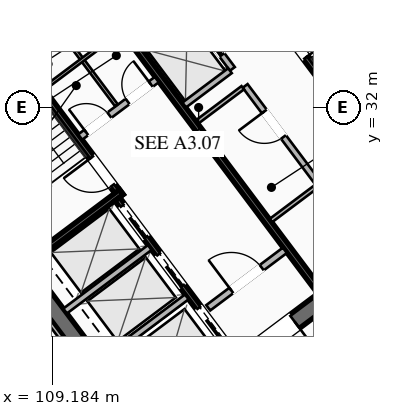
"""IFC4 building model, lengths in metres.
Left out: names, types, materials, properties, quantities, classifications, styles, units other than length and angle.
Written with IfcOpenShell. Run it as: python <this file> out.ifc"""

import sys

from ifc_helpers import new_model, si_unit, direction, frame, frame_2d, origin, place, context, subcontext, project, spatial, rectangle, extrude, element, fill, save


model = new_model("IFC4")
c1 = context("Model", 3, precision=1e-05, world=origin(), true_north=direction((0.0, 1.0)))
c2 = subcontext(c1, "Body", "Model", "MODEL_VIEW")
j1 = project(units=[si_unit("LENGTHUNIT", "METRE"), si_unit("PLANEANGLEUNIT", "RADIAN")], contexts=[c1])
p1 = place(None, origin())
s1 = spatial("IfcSite", under=j1, at=p1, CompositionType="ELEMENT")
p2 = place(p1, origin())
s2 = spatial("IfcBuilding", under=s1, at=p2, CompositionType="ELEMENT")
p3 = place(p2, frame((0.0, 0.0, 132.15)))
s3 = spatial("IfcBuildingStorey", under=s2, at=p3, CompositionType="ELEMENT", Elevation=132.15)
for number, where, z_axis, x_axis in (
    (1, (112.436, 21.077, 0.0), (0.0, 0.0, 1.0), (-0.6, 0.8, 0.0)),
    (2, (115.564, 42.923, 0.0), (0.0, 0.0, 1.0), (0.6, -0.8, 0.0)),
):
    element("IfcWall", number, at=place(p3, frame(where, z_axis=z_axis, x_axis=x_axis)), inside=s3, PredefinedType="SHEAR", context=c2, shape_type="SweptSolid", body=[
        extrude(rectangle(XDim=15.6, YDim=0.55, at=frame_2d((7.8, 0.0))), origin(), (0.0, 0.0, 1.0), 3.55),
    ])
p4 = place(p3, frame((124.539, 30.498, 0.0), z_axis=(0.0, 0.0, 1.0), x_axis=(-0.799998054672, -0.600002593761, 0.0)))
e3 = element("IfcWall", 3, at=p4, inside=s3, PredefinedType="SHEAR", context=c2, shape_type="SweptSolid", body=[
    extrude(rectangle(XDim=15.06, YDim=0.55, at=frame_2d((7.53, 0.0))), origin(), (0.0, 0.0, 1.0), 3.55),
])
p5 = place(p4, frame((9.23, 0.0, 0.0)))
e4 = element("IfcOpeningElement", 4, at=p5, cuts=e3, PredefinedType="OPENING", context=c2, shape_type="SweptSolid", body=[
    extrude(rectangle(XDim=1.25, YDim=2.25, at=frame_2d((0.625, 1.125))), frame((0.0, 0.285, 0.0), z_axis=(0.0, -1.0, 0.0), x_axis=(1.0, 0.0, 0.0)), (0.0, 0.0, 1.0), 0.57),
])
p6 = place(p4, frame((4.18, 0.0, 0.0)))
e5 = element("IfcOpeningElement", 5, at=p6, cuts=e3, PredefinedType="OPENING", context=c2, shape_type="SweptSolid", body=[
    extrude(rectangle(XDim=1.25, YDim=2.25, at=frame_2d((0.625, 1.125))), frame((0.0, 0.285, 0.0), z_axis=(0.0, -1.0, 0.0), x_axis=(1.0, 0.0, 0.0)), (0.0, 0.0, 1.0), 0.57),
])
p7 = place(p3, frame((103.461, 33.502, 0.0), z_axis=(0.0, 0.0, 1.0), x_axis=(0.799998054672, 0.600002593761, 0.0)))
e6 = element("IfcWall", 6, at=p7, inside=s3, PredefinedType="SHEAR", context=c2, shape_type="SweptSolid", body=[
    extrude(rectangle(XDim=15.06, YDim=0.55, at=frame_2d((7.53, 0.0))), origin(), (0.0, 0.0, 1.0), 3.55),
])
p8 = place(p7, frame((4.58, 0.0, 0.0)))
e7 = element("IfcOpeningElement", 7, at=p8, cuts=e6, PredefinedType="OPENING", context=c2, shape_type="SweptSolid", body=[
    extrude(rectangle(XDim=1.25, YDim=2.25, at=frame_2d((0.625, 1.125))), frame((0.0, 0.285, 0.0), z_axis=(0.0, -1.0, 0.0), x_axis=(1.0, 0.0, 0.0)), (0.0, 0.0, 1.0), 0.57),
])
p9 = place(p7, frame((9.63, 0.0, 0.0)))
e8 = element("IfcOpeningElement", 8, at=p9, cuts=e6, PredefinedType="OPENING", context=c2, shape_type="SweptSolid", body=[
    extrude(rectangle(XDim=1.25, YDim=2.25, at=frame_2d((0.625, 1.125))), frame((0.0, 0.285, 0.0), z_axis=(0.0, -1.0, 0.0), x_axis=(1.0, 0.0, 0.0)), (0.0, 0.0, 1.0), 0.57),
])
p10 = place(p3, frame((111.44, 29.08, 0.0), z_axis=(0.0, 0.0, 1.0), x_axis=(-0.59999029481, 0.8000072788, 0.0)))
e9 = element("IfcWall", 9, at=p10, inside=s3, PredefinedType="SHEAR", context=c2, shape_type="SweptSolid", body=[
    extrude(rectangle(XDim=8.05, YDim=0.2, at=frame_2d((4.025, 0.0))), origin(), (0.0, 0.0, 1.0), 3.37),
])
p11 = place(p10, frame((0.45, 0.0, 0.0)))
e10 = element("IfcOpeningElement", 10, at=p11, cuts=e9, PredefinedType="OPENING", context=c2, shape_type="SweptSolid", body=[
    extrude(rectangle(XDim=1.15, YDim=2.2, at=frame_2d((0.575, 1.1))), frame((0.0, 0.11, 0.0), z_axis=(0.0, -1.0, 0.0), x_axis=(1.0, 0.0, 0.0)), (0.0, 0.0, 1.0), 0.22),
])
p12 = place(p3, frame((108.396, 26.922, 0.0), z_axis=(0.0, 0.0, 1.0), x_axis=(0.800015298837, 0.599979601008, 0.0)))
e11 = element("IfcWall", 11, at=p12, inside=s3, PredefinedType="SHEAR", context=c2, shape_type="SweptSolid", body=[
    extrude(rectangle(XDim=3.83, YDim=0.2, at=frame_2d((1.915, 0.0))), origin(), (0.0, 0.0, 1.0), 3.37),
])
p13 = place(p3, frame((116.56, 34.92, 0.0), z_axis=(0.0, 0.0, 1.0), x_axis=(0.59999029481, -0.8000072788, 0.0)))
e12 = element("IfcWall", 12, at=p13, inside=s3, PredefinedType="SHEAR", context=c2, shape_type="SweptSolid", body=[
    extrude(rectangle(XDim=8.05, YDim=0.2, at=frame_2d((4.025, 0.0))), origin(), (0.0, 0.0, 1.0), 3.37),
])
p14 = place(p13, frame((0.45, 0.0, 0.0)))
e13 = element("IfcOpeningElement", 13, at=p14, cuts=e12, PredefinedType="OPENING", context=c2, shape_type="SweptSolid", body=[
    extrude(rectangle(XDim=1.15, YDim=2.2, at=frame_2d((0.575, 1.1))), frame((0.0, 0.11, 0.0), z_axis=(0.0, -1.0, 0.0), x_axis=(1.0, 0.0, 0.0)), (0.0, 0.0, 1.0), 0.22),
])
p15 = place(p3, frame((117.998, 25.936, 0.0), z_axis=(0.0, 0.0, 1.0), x_axis=(-0.600002693989, 0.799997979501, 0.0)))
e14 = element("IfcWall", 14, at=p15, inside=s3, PredefinedType="SHEAR", context=c2, shape_type="SweptSolid", body=[
    extrude(rectangle(XDim=14.5, YDim=0.2, at=frame_2d((7.25, 0.0))), origin(), (0.0, 0.0, 1.0), 3.37),
])
p16 = place(p3, frame((110.104, 31.028, 0.0), z_axis=(0.0, 0.0, 1.0), x_axis=(0.800018601094, 0.59997519774, 0.0)))
e15 = element("IfcWall", 15, at=p16, inside=s3, PredefinedType="SOLIDWALL", context=c2, shape_type="SweptSolid", body=[
    extrude(rectangle(XDim=3.15, YDim=0.22, at=frame_2d((1.575, 0.0))), origin(), (0.0, 0.0, 1.0), 2.723),
])
p17 = place(p16, frame((0.25, 0.0, 0.0)))
e16 = element("IfcOpeningElement", 16, at=p17, cuts=e15, PredefinedType="OPENING", context=c2, shape_type="SweptSolid", body=[
    extrude(rectangle(XDim=0.95, YDim=2.05, at=frame_2d((0.475, 1.025))), frame((0.0, 0.12, 0.0), z_axis=(0.0, -1.0, 0.0), x_axis=(1.0, 0.0, 0.0)), (0.0, 0.0, 1.0), 0.24),
])
p18 = place(p16, frame((1.95, 0.0, 0.0)))
e17 = element("IfcOpeningElement", 17, at=p18, cuts=e15, PredefinedType="OPENING", context=c2, shape_type="SweptSolid", body=[
    extrude(rectangle(XDim=0.95, YDim=2.05, at=frame_2d((0.475, 1.025))), frame((0.0, 0.12, 0.0), z_axis=(0.0, -1.0, 0.0), x_axis=(1.0, 0.0, 0.0)), (0.0, 0.0, 1.0), 0.24),
])
p19 = place(p3, frame((114.316, 25.412, 0.0), z_axis=(0.0, 0.0, 1.0), x_axis=(0.800018601094, 0.59997519774, 0.0)))
e18 = element("IfcWall", 18, at=p19, inside=s3, PredefinedType="SOLIDWALL", context=c2, shape_type="SweptSolid", body=[
    extrude(rectangle(XDim=3.15, YDim=0.22, at=frame_2d((1.575, 0.0))), origin(), (0.0, 0.0, 1.0), 2.723),
])
p20 = place(p19, frame((0.95, 0.0, 0.0)))
e19 = element("IfcOpeningElement", 19, at=p20, cuts=e18, PredefinedType="OPENING", context=c2, shape_type="SweptSolid", body=[
    extrude(rectangle(XDim=1.25, YDim=2.25, at=frame_2d((0.625, 1.125))), frame((0.0, 0.12, 0.0), z_axis=(0.0, -1.0, 0.0), x_axis=(1.0, 0.0, 0.0)), (0.0, 0.0, 1.0), 0.24),
])
p21 = place(p3, frame((115.19, 23.83, 0.0), z_axis=(0.0, 0.0, 1.0), x_axis=(-0.599993943644, 0.800004542231, 0.0)))
e20 = element("IfcWall", 20, at=p21, inside=s3, PredefinedType="SHEAR", context=c2, shape_type="SweptSolid", body=[
    extrude(rectangle(XDim=6.45, YDim=0.2, at=frame_2d((3.225, 0.0))), origin(), (0.0, 0.0, 1.0), 3.37),
])
p22 = place(p21, frame((4.875, 0.0, 0.0)))
e21 = element("IfcOpeningElement", 21, at=p22, cuts=e20, PredefinedType="OPENING", context=c2, shape_type="SweptSolid", body=[
    extrude(rectangle(XDim=1.3, YDim=2.25, at=frame_2d((0.65, 1.125))), frame((0.0, 0.11, 0.0), z_axis=(0.0, -1.0, 0.0), x_axis=(1.0, 0.0, 0.0)), (0.0, 0.0, 1.0), 0.22),
])
p23 = place(p21, frame((2.875, 0.0, 0.0)))
e22 = element("IfcOpeningElement", 22, at=p23, cuts=e20, PredefinedType="OPENING", context=c2, shape_type="SweptSolid", body=[
    extrude(rectangle(XDim=1.3, YDim=2.25, at=frame_2d((0.65, 1.125))), frame((0.0, 0.11, 0.0), z_axis=(0.0, -1.0, 0.0), x_axis=(1.0, 0.0, 0.0)), (0.0, 0.0, 1.0), 0.22),
])
p24 = place(p21, frame((0.675, 0.0, 0.0)))
e23 = element("IfcOpeningElement", 23, at=p24, cuts=e20, PredefinedType="OPENING", context=c2, shape_type="SweptSolid", body=[
    extrude(rectangle(XDim=1.3, YDim=2.25, at=frame_2d((0.65, 1.125))), frame((0.0, 0.11, 0.0), z_axis=(0.0, -1.0, 0.0), x_axis=(1.0, 0.0, 0.0)), (0.0, 0.0, 1.0), 0.22),
])
for number, where, z_axis, x_axis in (
    (24, (110.826, 23.682, 0.0), (0.0, 0.0, 1.0), (0.8, 0.6, 0.0)),
    (25, (109.608, 25.306, 0.0), (0.0, 0.0, 1.0), (0.8, 0.6, 0.0)),
):
    element("IfcWall", number, at=place(p3, frame(where, z_axis=z_axis, x_axis=x_axis)), inside=s3, PredefinedType="SOLIDWALL", context=c2, shape_type="SweptSolid", body=[
        extrude(rectangle(XDim=3.48, YDim=0.2, at=frame_2d((1.74, 0.0))), origin(), (0.0, 0.0, 1.0), 3.37),
    ])
p25 = place(p3, frame((111.296, 32.072, 0.0), z_axis=(0.0, 0.0, 1.0), x_axis=(-0.59995887973, 0.800030838552, 0.0)))
e26 = element("IfcWall", 26, at=p25, inside=s3, PredefinedType="PARTITIONING", context=c2, shape_type="SweptSolid", body=[
    extrude(rectangle(XDim=3.8, YDim=0.11, at=frame_2d((1.9, 0.0))), origin(), (0.0, 0.0, 1.0), 2.723),
])
p26 = place(p3, frame((108.91, 32.62, 0.0), z_axis=(0.0, 0.0, 1.0), x_axis=(0.800018601094, 0.59997519774, 0.0)))
e27 = element("IfcWall", 27, at=p26, inside=s3, PredefinedType="PARTITIONING", context=c2, shape_type="SweptSolid", body=[
    extrude(rectangle(XDim=3.15, YDim=0.11, at=frame_2d((1.575, 0.0))), origin(), (0.0, 0.0, 1.0), 2.723),
])
p27 = place(p3, frame((119.67, 27.19, 0.0), z_axis=(0.0, 0.0, 1.0), x_axis=(-0.599988677396, 0.800008491828, 0.0)))
e28 = element("IfcWall", 28, at=p27, inside=s3, PredefinedType="SOLIDWALL", context=c2, shape_type="SweptSolid", body=[
    extrude(rectangle(XDim=6.9, YDim=0.2, at=frame_2d((3.45, 0.0))), origin(), (0.0, 0.0, 1.0), 2.723),
])
p28 = place(p27, frame((0.85, 0.0, 0.0)))
e29 = element("IfcOpeningElement", 29, at=p28, cuts=e28, PredefinedType="OPENING", context=c2, shape_type="SweptSolid", body=[
    extrude(rectangle(XDim=0.95, YDim=2.05, at=frame_2d((0.475, 1.025))), frame((0.0, 0.11, 0.0), z_axis=(0.0, -1.0, 0.0), x_axis=(1.0, 0.0, 0.0)), (0.0, 0.0, 1.0), 0.22),
])
p29 = place(p27, frame((4.8, 0.0, 0.0)))
e30 = element("IfcOpeningElement", 30, at=p29, cuts=e28, PredefinedType="OPENING", context=c2, shape_type="SweptSolid", body=[
    extrude(rectangle(XDim=1.05, YDim=2.2, at=frame_2d((0.525, 1.1))), frame((0.0, 0.11, 0.0), z_axis=(0.0, -1.0, 0.0), x_axis=(1.0, 0.0, 0.0)), (0.0, 0.0, 1.0), 0.22),
])
for number, where, z_axis, x_axis in (
    (31, (113.946, 31.522, 0.0), (0.0, 0.0, 1.0), (0.8, 0.6, 0.0)),
    (32, (116.376, 28.282, 0.0), (0.0, 0.0, 1.0), (0.8, 0.6, 0.0)),
):
    element("IfcWall", number, at=place(p3, frame(where, z_axis=z_axis, x_axis=x_axis)), inside=s3, PredefinedType="PARTITIONING", context=c2, shape_type="SweptSolid", body=[
        extrude(rectangle(XDim=1.88, YDim=0.135, at=frame_2d((0.94, 0.0))), origin(), (0.0, 0.0, 1.0), 2.723),
    ])
p30 = place(p3, frame((115.11, 33.27, 0.0), z_axis=(0.0, 0.0, 1.0), x_axis=(-0.600011322243, 0.799991508192, 0.0)))
e33 = element("IfcWall", 33, at=p30, inside=s3, PredefinedType="SOLIDWALL", context=c2, shape_type="SweptSolid", body=[
    extrude(rectangle(XDim=6.9, YDim=0.2, at=frame_2d((3.45, 0.0))), origin(), (0.0, 0.0, 1.0), 3.37),
])
p31 = place(p30, frame((0.575, 0.0, 0.0)))
e34 = element("IfcOpeningElement", 34, at=p31, cuts=e33, PredefinedType="OPENING", context=c2, shape_type="SweptSolid", body=[
    extrude(rectangle(XDim=1.1, YDim=2.2, at=frame_2d((0.55, 1.1))), frame((0.0, 0.11, 0.0), z_axis=(0.0, -1.0, 0.0), x_axis=(1.0, 0.0, 0.0)), (0.0, 0.0, 1.0), 0.22),
])
p32 = place(p30, frame((2.825, 0.0, 0.0)))
e35 = element("IfcOpeningElement", 35, at=p32, cuts=e33, PredefinedType="OPENING", context=c2, shape_type="SweptSolid", body=[
    extrude(rectangle(XDim=1.1, YDim=2.2, at=frame_2d((0.55, 1.1))), frame((0.0, 0.11, 0.0), z_axis=(0.0, -1.0, 0.0), x_axis=(1.0, 0.0, 0.0)), (0.0, 0.0, 1.0), 0.22),
])
p33 = place(p30, frame((5.075, 0.0, 0.0)))
e36 = element("IfcOpeningElement", 36, at=p33, cuts=e33, PredefinedType="OPENING", context=c2, shape_type="SweptSolid", body=[
    extrude(rectangle(XDim=1.1, YDim=2.2, at=frame_2d((0.55, 1.1))), frame((0.0, 0.11, 0.0), z_axis=(0.0, -1.0, 0.0), x_axis=(1.0, 0.0, 0.0)), (0.0, 0.0, 1.0), 0.22),
])
p34 = place(p3, frame((113.526, 32.082, 0.0), z_axis=(0.0, 0.0, 1.0), x_axis=(0.800046745961, 0.599937666993, 0.0)))
e37 = element("IfcWall", 37, at=p34, inside=s3, PredefinedType="SOLIDWALL", context=c2, shape_type="SweptSolid", body=[
    extrude(rectangle(XDim=1.88, YDim=0.2, at=frame_2d((0.94, 0.0))), origin(), (0.0, 0.0, 1.0), 3.37),
])
p35 = place(p3, frame((112.176, 33.882, 0.0), z_axis=(0.0, 0.0, 1.0), x_axis=(0.8, 0.6, 0.0)))
e38 = element("IfcWall", 38, at=p35, inside=s3, PredefinedType="SOLIDWALL", context=c2, shape_type="SweptSolid", body=[
    extrude(rectangle(XDim=1.88, YDim=0.2, at=frame_2d((0.94, 0.0))), origin(), (0.0, 0.0, 1.0), 3.37),
])
p36 = place(p3, frame((95.87, 30.09, 0.0), z_axis=(0.0, 0.0, 1.0), x_axis=(0.799997191971, 0.600003744021, 0.0)))
e39 = element("IfcWall", 39, at=p36, inside=s3, PredefinedType="PARTITIONING", context=c2, shape_type="SweptSolid", body=[
    extrude(rectangle(XDim=31.3, YDim=0.135, at=frame_2d((15.65, 0.0))), origin(), (0.0, 0.0, 1.0), 2.723),
])
p37 = place(p36, frame((0.3, 0.0, 0.0)))
e40 = element("IfcOpeningElement", 40, at=p37, cuts=e39, PredefinedType="OPENING", context=c2, shape_type="SweptSolid", body=[
    extrude(rectangle(XDim=0.95, YDim=2.05, at=frame_2d((0.475, 1.025))), frame((0.0, 0.077, 0.0), z_axis=(0.0, -1.0, 0.0), x_axis=(1.0, 0.0, 0.0)), (0.0, 0.0, 1.0), 0.155),
])
p38 = place(p36, frame((11.202, 0.0, 0.0)))
e41 = element("IfcOpeningElement", 41, at=p38, cuts=e39, PredefinedType="OPENING", context=c2, shape_type="SweptSolid", body=[
    extrude(rectangle(XDim=0.95, YDim=2.05, at=frame_2d((0.475, 1.025))), frame((0.0, 0.077, 0.0), z_axis=(0.0, -1.0, 0.0), x_axis=(1.0, 0.0, 0.0)), (0.0, 0.0, 1.0), 0.155),
])
p39 = place(p36, frame((15.474, 0.0, 0.0)))
e42 = element("IfcOpeningElement", 42, at=p39, cuts=e39, PredefinedType="OPENING", context=c2, shape_type="SweptSolid", body=[
    extrude(rectangle(XDim=0.95, YDim=2.05, at=frame_2d((0.475, 1.025))), frame((0.0, 0.077, 0.0), z_axis=(0.0, -1.0, 0.0), x_axis=(1.0, 0.0, 0.0)), (0.0, 0.0, 1.0), 0.155),
])
p40 = place(p36, frame((30.05, 0.0, 0.0)))
e43 = element("IfcOpeningElement", 43, at=p40, cuts=e39, PredefinedType="OPENING", context=c2, shape_type="SweptSolid", body=[
    extrude(rectangle(XDim=0.95, YDim=2.05, at=frame_2d((0.475, 1.025))), frame((0.0, 0.077, 0.0), z_axis=(0.0, -1.0, 0.0), x_axis=(1.0, 0.0, 0.0)), (0.0, 0.0, 1.0), 0.155),
])
p41 = place(p3, frame((132.832, 32.974, 0.0), z_axis=(0.0, 0.0, 1.0), x_axis=(-0.8, -0.6, 0.0)))
e44 = element("IfcWall", 44, at=p41, inside=s3, PredefinedType="PARTITIONING", context=c2, shape_type="SweptSolid", body=[
    extrude(rectangle(XDim=31.3, YDim=0.135, at=frame_2d((15.65, 0.0))), origin(), (0.0, 0.0, 1.0), 2.723),
])
p42 = place(p41, frame((29.97, 0.0, 0.0)))
e45 = element("IfcOpeningElement", 45, at=p42, cuts=e44, PredefinedType="OPENING", context=c2, shape_type="SweptSolid", body=[
    extrude(rectangle(XDim=0.95, YDim=2.05, at=frame_2d((0.475, 1.025))), frame((0.0, 0.077, 0.0), z_axis=(0.0, -1.0, 0.0), x_axis=(1.0, 0.0, 0.0)), (0.0, 0.0, 1.0), 0.155),
])
p43 = place(p41, frame((15.053, 0.0, 0.0)))
e46 = element("IfcOpeningElement", 46, at=p43, cuts=e44, PredefinedType="OPENING", context=c2, shape_type="SweptSolid", body=[
    extrude(rectangle(XDim=0.95, YDim=2.05, at=frame_2d((0.475, 1.025))), frame((0.0, 0.077, 0.0), z_axis=(0.0, -1.0, 0.0), x_axis=(1.0, 0.0, 0.0)), (0.0, 0.0, 1.0), 0.155),
])
p44 = place(p41, frame((0.38, 0.0, 0.0)))
e47 = element("IfcOpeningElement", 47, at=p44, cuts=e44, PredefinedType="OPENING", context=c2, shape_type="SweptSolid", body=[
    extrude(rectangle(XDim=0.95, YDim=2.05, at=frame_2d((0.475, 1.025))), frame((0.0, 0.077, 0.0), z_axis=(0.0, -1.0, 0.0), x_axis=(1.0, 0.0, 0.0)), (0.0, 0.0, 1.0), 0.155),
])
p45 = place(p3, frame((112.104, 20.928, 0.0), z_axis=(0.0, 0.0, 1.0), x_axis=(-0.599994940075, 0.800003794918, 0.0)))
e48 = element("IfcWall", 48, at=p45, inside=s3, PredefinedType="PARTITIONING", context=c2, shape_type="SweptSolid", body=[
    extrude(rectangle(XDim=15.44, YDim=0.135, at=frame_2d((7.72, 0.0))), origin(), (0.0, 0.0, 1.0), 2.723),
])
p46 = place(p5, origin())
e49 = element("IfcDoor", 49, at=p46, inside=s3, OperationType="SINGLE_SWING_LEFT", PredefinedType="DOOR", context=c2, shape_type="SweptSolid", body=[
    extrude(rectangle(XDim=1.25, YDim=2.25, at=frame_2d((0.625, 1.125))), frame((0.0, 0.025, 0.0), z_axis=(0.0, -1.0, 0.0), x_axis=(1.0, 0.0, 0.0)), (0.0, 0.0, 1.0), 0.05),
])
fill(e4, e49)
p47 = place(p11, origin())
e50 = element("IfcDoor", 50, at=p47, inside=s3, OperationType="SINGLE_SWING_RIGHT", PredefinedType="DOOR", context=c2, shape_type="SweptSolid", body=[
    extrude(rectangle(XDim=1.15, YDim=2.2, at=frame_2d((0.575, 1.1))), frame((0.0, 0.025, 0.0), z_axis=(0.0, -1.0, 0.0), x_axis=(1.0, 0.0, 0.0)), (0.0, 0.0, 1.0), 0.05),
])
fill(e10, e50)
p48 = place(p14, origin())
e51 = element("IfcDoor", 51, at=p48, inside=s3, OperationType="SINGLE_SWING_RIGHT", PredefinedType="DOOR", context=c2, shape_type="SweptSolid", body=[
    extrude(rectangle(XDim=1.15, YDim=2.2, at=frame_2d((0.575, 1.1))), frame((0.0, 0.025, 0.0), z_axis=(0.0, -1.0, 0.0), x_axis=(1.0, 0.0, 0.0)), (0.0, 0.0, 1.0), 0.05),
])
fill(e13, e51)
p49 = place(p20, origin())
e52 = element("IfcDoor", 52, at=p49, inside=s3, OperationType="SINGLE_SWING_LEFT", PredefinedType="DOOR", context=c2, shape_type="SweptSolid", body=[
    extrude(rectangle(XDim=1.25, YDim=2.25, at=frame_2d((0.625, 1.125))), frame((0.0, 0.025, 0.0), z_axis=(0.0, -1.0, 0.0), x_axis=(1.0, 0.0, 0.0)), (0.0, 0.0, 1.0), 0.05),
])
fill(e19, e52)
p50 = place(p17, origin())
e53 = element("IfcDoor", 53, at=p50, inside=s3, OperationType="SINGLE_SWING_LEFT", PredefinedType="DOOR", context=c2, shape_type="SweptSolid", body=[
    extrude(rectangle(XDim=0.95, YDim=2.05, at=frame_2d((0.475, 1.025))), frame((0.0, 0.025, 0.0), z_axis=(0.0, -1.0, 0.0), x_axis=(1.0, 0.0, 0.0)), (0.0, 0.0, 1.0), 0.05),
])
fill(e16, e53)
p51 = place(p18, origin())
e54 = element("IfcDoor", 54, at=p51, inside=s3, OperationType="SINGLE_SWING_RIGHT", PredefinedType="DOOR", context=c2, shape_type="SweptSolid", body=[
    extrude(rectangle(XDim=0.95, YDim=2.05, at=frame_2d((0.475, 1.025))), frame((0.0, 0.025, 0.0), z_axis=(0.0, -1.0, 0.0), x_axis=(1.0, 0.0, 0.0)), (0.0, 0.0, 1.0), 0.05),
])
fill(e17, e54)
p52 = place(p29, origin())
e55 = element("IfcDoor", 55, at=p52, inside=s3, OperationType="SINGLE_SWING_RIGHT", PredefinedType="DOOR", context=c2, shape_type="SweptSolid", body=[
    extrude(rectangle(XDim=1.05, YDim=2.2, at=frame_2d((0.525, 1.1))), frame((0.0, 0.025, 0.0), z_axis=(0.0, -1.0, 0.0), x_axis=(1.0, 0.0, 0.0)), (0.0, 0.0, 1.0), 0.05),
])
fill(e30, e55)
p53 = place(p22, origin())
e56 = element("IfcDoor", 56, at=p53, inside=s3, OperationType="SLIDING_TO_LEFT", PredefinedType="DOOR", context=c2, shape_type="SweptSolid", body=[
    extrude(rectangle(XDim=1.3, YDim=2.25, at=frame_2d((0.65, 1.125))), frame((0.0, 0.025, 0.0), z_axis=(0.0, -1.0, 0.0), x_axis=(1.0, 0.0, 0.0)), (0.0, 0.0, 1.0), 0.05),
])
fill(e21, e56)
p54 = place(p23, origin())
e57 = element("IfcDoor", 57, at=p54, inside=s3, OperationType="SLIDING_TO_LEFT", PredefinedType="DOOR", context=c2, shape_type="SweptSolid", body=[
    extrude(rectangle(XDim=1.3, YDim=2.25, at=frame_2d((0.65, 1.125))), frame((0.0, 0.025, 0.0), z_axis=(0.0, -1.0, 0.0), x_axis=(1.0, 0.0, 0.0)), (0.0, 0.0, 1.0), 0.05),
])
fill(e22, e57)
p55 = place(p24, origin())
e58 = element("IfcDoor", 58, at=p55, inside=s3, OperationType="SLIDING_TO_LEFT", PredefinedType="DOOR", context=c2, shape_type="SweptSolid", body=[
    extrude(rectangle(XDim=1.3, YDim=2.25, at=frame_2d((0.65, 1.125))), frame((0.0, 0.025, 0.0), z_axis=(0.0, -1.0, 0.0), x_axis=(1.0, 0.0, 0.0)), (0.0, 0.0, 1.0), 0.05),
])
fill(e23, e58)
p56 = place(p31, origin())
e59 = element("IfcDoor", 59, at=p56, inside=s3, OperationType="SLIDING_TO_LEFT", PredefinedType="DOOR", context=c2, shape_type="SweptSolid", body=[
    extrude(rectangle(XDim=1.1, YDim=2.2, at=frame_2d((0.55, 1.1))), frame((0.0, 0.025, 0.0), z_axis=(0.0, -1.0, 0.0), x_axis=(1.0, 0.0, 0.0)), (0.0, 0.0, 1.0), 0.05),
])
fill(e34, e59)
save(model, sys.argv[1])
